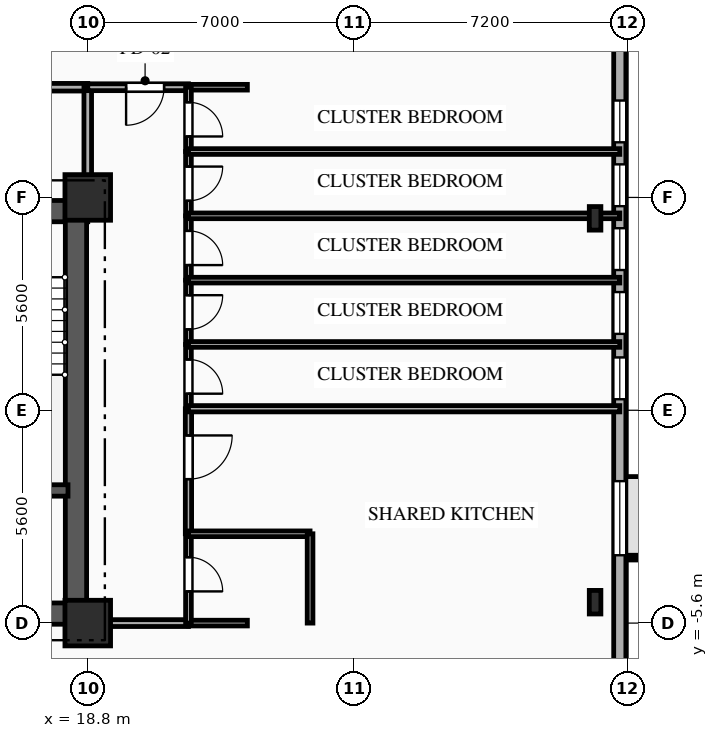
"""IFC4 building model, lengths in metres.
Left out: names, types, materials, properties, quantities, classifications, styles, units other than length and angle.
Written with IfcOpenShell. Run it as: python <this file> out.ifc"""

import sys

from ifc_helpers import new_model, si_unit, direction, frame, frame_2d, origin, origin_2d, place, context, subcontext, project, spatial, rectangle, i_section, extrude, element, fill, save


model = new_model("IFC4")
c1 = context("Model", 3, precision=1e-05, world=origin(), true_north=direction((0.0, 1.0)))
c2 = subcontext(c1, "Body", "Model", "MODEL_VIEW")
j1 = project(units=[si_unit("LENGTHUNIT", "METRE"), si_unit("PLANEANGLEUNIT", "RADIAN")], contexts=[c1])
p1 = place(None, origin())
s1 = spatial("IfcSite", under=j1, at=p1, CompositionType="ELEMENT")
p2 = place(p1, origin())
s2 = spatial("IfcBuilding", under=s1, at=p2, CompositionType="ELEMENT")
p3 = place(p2, frame((0.0, 0.0, 43.75)))
s3 = spatial("IfcBuildingStorey", under=s2, at=p3, CompositionType="ELEMENT", Elevation=43.75)
for number, where, z_axis, x_axis in (
    (1, (18.8, -5.6, 0.0), (0.0, 0.0, 1.0), (1.0, 0.0, 0.0)),
    (2, (18.8, 5.6, 0.0), (0.0, 0.0, 1.0), (1.0, 0.0, 0.0)),
):
    element("IfcColumn", number, at=place(p3, frame(where, z_axis=z_axis, x_axis=x_axis)), inside=s3, PredefinedType="COLUMN", context=c2, shape_type="SweptSolid", body=[
        extrude(rectangle(XDim=1.2, YDim=1.2, at=origin_2d()), origin(), (0.0, 0.0, 1.0), 3.35),
    ])
for number, where, z_axis, x_axis in (
    (3, (32.15, -5.05, 0.0), (0.0, 0.0, 1.0), (1.0, 0.0, 0.0)),
    (4, (32.15, 5.05, 0.0), (0.0, 0.0, 1.0), (1.0, 0.0, 0.0)),
):
    element("IfcColumn", number, at=place(p3, frame(where, z_axis=z_axis, x_axis=x_axis)), inside=s3, PredefinedType="COLUMN", context=c2, shape_type="SweptSolid", body=[
        extrude(i_section(OverallWidth=0.305, OverallDepth=0.62, WebThickness=0.021, FlangeThickness=0.04, FilletRadius=0.027, at=origin_2d()), origin(), (0.0, 0.0, 1.0), 3.35),
    ])
p4 = place(p3, frame((32.8, 15.8, 0.0), z_axis=(0.0, 0.0, 1.0), x_axis=(0.0, -1.0, 0.0)))
e5 = element("IfcWall", 5, at=p4, inside=s3, PredefinedType="SOLIDWALL", context=c2, shape_type="SweptSolid", body=[
    extrude(rectangle(XDim=31.6, YDim=0.32, at=frame_2d((15.8, 0.0))), origin(), (0.0, 0.0, 1.0), 3.035),
])
p5 = place(p4, frame((7.65, 0.0, 0.85)))
e6 = element("IfcOpeningElement", 6, at=p5, cuts=e5, PredefinedType="OPENING", context=c2, shape_type="SweptSolid", body=[
    extrude(rectangle(XDim=1.1, YDim=1.85, at=frame_2d((0.55, 0.925))), frame((0.0, 0.17, 0.0), z_axis=(0.0, -1.0, 0.0), x_axis=(1.0, 0.0, 0.0)), (0.0, 0.0, 1.0), 0.34),
])
p6 = place(p4, frame((9.33, 0.0, 0.85)))
e7 = element("IfcOpeningElement", 7, at=p6, cuts=e5, PredefinedType="OPENING", context=c2, shape_type="SweptSolid", body=[
    extrude(rectangle(XDim=1.1, YDim=1.85, at=frame_2d((0.55, 0.925))), frame((0.0, 0.17, 0.0), z_axis=(0.0, -1.0, 0.0), x_axis=(1.0, 0.0, 0.0)), (0.0, 0.0, 1.0), 0.34),
])
p7 = place(p4, frame((11.01, 0.0, 0.85)))
e8 = element("IfcOpeningElement", 8, at=p7, cuts=e5, PredefinedType="OPENING", context=c2, shape_type="SweptSolid", body=[
    extrude(rectangle(XDim=1.1, YDim=1.85, at=frame_2d((0.55, 0.925))), frame((0.0, 0.17, 0.0), z_axis=(0.0, -1.0, 0.0), x_axis=(1.0, 0.0, 0.0)), (0.0, 0.0, 1.0), 0.34),
])
p8 = place(p4, frame((12.69, 0.0, 0.85)))
e9 = element("IfcOpeningElement", 9, at=p8, cuts=e5, PredefinedType="OPENING", context=c2, shape_type="SweptSolid", body=[
    extrude(rectangle(XDim=1.1, YDim=1.85, at=frame_2d((0.55, 0.925))), frame((0.0, 0.17, 0.0), z_axis=(0.0, -1.0, 0.0), x_axis=(1.0, 0.0, 0.0)), (0.0, 0.0, 1.0), 0.34),
])
p9 = place(p4, frame((14.41, 0.0, 0.85)))
e10 = element("IfcOpeningElement", 10, at=p9, cuts=e5, PredefinedType="OPENING", context=c2, shape_type="SweptSolid", body=[
    extrude(rectangle(XDim=1.1, YDim=1.85, at=frame_2d((0.55, 0.925))), frame((0.0, 0.17, 0.0), z_axis=(0.0, -1.0, 0.0), x_axis=(1.0, 0.0, 0.0)), (0.0, 0.0, 1.0), 0.34),
])
p10 = place(p4, frame((17.665, 0.0, 0.85)))
e11 = element("IfcOpeningElement", 11, at=p10, cuts=e5, PredefinedType="OPENING", context=c2, shape_type="SweptSolid", body=[
    extrude(rectangle(XDim=1.95, YDim=1.85, at=frame_2d((0.975, 0.925))), frame((0.0, 0.17, 0.0), z_axis=(0.0, -1.0, 0.0), x_axis=(1.0, 0.0, 0.0)), (0.0, 0.0, 1.0), 0.34),
])
p11 = place(p3, frame((9.2, 5.24, 0.0), z_axis=(0.0, 0.0, 1.0), x_axis=(1.0, 0.0, 0.0)))
e12 = element("IfcWall", 12, at=p11, inside=s3, PredefinedType="SHEAR", context=c2, shape_type="SweptSolid", body=[
    extrude(rectangle(XDim=9.6, YDim=0.56, at=frame_2d((4.8, 0.0))), origin(), (0.0, 0.0, 1.0), 3.035),
])
p12 = place(p11, frame((6.95, 0.0, 0.0)))
e13 = element("IfcOpeningElement", 13, at=p12, cuts=e12, PredefinedType="OPENING", context=c2, shape_type="SweptSolid", body=[
    extrude(rectangle(XDim=1.1, YDim=2.15, at=frame_2d((0.55, 1.075))), frame((0.0, 0.29, 0.0), z_axis=(0.0, -1.0, 0.0), x_axis=(1.0, 0.0, 0.0)), (0.0, 0.0, 1.0), 0.58),
])
p13 = place(p11, frame((3.775, 0.0, 0.0)))
e14 = element("IfcOpeningElement", 14, at=p13, cuts=e12, PredefinedType="OPENING", context=c2, shape_type="SweptSolid", body=[
    extrude(rectangle(XDim=1.05, YDim=2.1, at=frame_2d((0.525, 1.05))), frame((0.0, 0.29, 0.0), z_axis=(0.0, -1.0, 0.0), x_axis=(1.0, 0.0, 0.0)), (0.0, 0.0, 1.0), 0.58),
])
p14 = place(p3, frame((9.2, -5.35, 0.0), z_axis=(0.0, 0.0, 1.0), x_axis=(1.0, 0.0, 0.0)))
e15 = element("IfcWall", 15, at=p14, inside=s3, PredefinedType="SHEAR", context=c2, shape_type="SweptSolid", body=[
    extrude(rectangle(XDim=9.6, YDim=0.56, at=frame_2d((4.8, 0.0))), origin(), (0.0, 0.0, 1.0), 3.035),
])
p15 = place(p14, frame((7.65, 0.0, 0.0)))
e16 = element("IfcOpeningElement", 16, at=p15, cuts=e15, PredefinedType="OPENING", context=c2, shape_type="SweptSolid", body=[
    extrude(rectangle(XDim=0.9, YDim=2.1, at=frame_2d((0.45, 1.05))), frame((0.0, 0.29, 0.0), z_axis=(0.0, -1.0, 0.0), x_axis=(1.0, 0.0, 0.0)), (0.0, 0.0, 1.0), 0.58),
])
p16 = place(p3, frame((18.49, -5.05, 0.0), z_axis=(0.0, 0.0, 1.0), x_axis=(0.0, 1.0, 0.0)))
e17 = element("IfcWall", 17, at=p16, inside=s3, PredefinedType="SHEAR", context=c2, shape_type="SweptSolid", body=[
    extrude(rectangle(XDim=10.1, YDim=0.56, at=frame_2d((5.05, 0.0))), origin(), (0.0, 0.0, 1.0), 3.035),
])
p17 = place(p3, frame((15.1, -2.11, 0.0), z_axis=(0.0, 0.0, 1.0), x_axis=(1.0, 0.0, 0.0)))
e18 = element("IfcWall", 18, at=p17, inside=s3, PredefinedType="SHEAR", context=c2, shape_type="SweptSolid", body=[
    extrude(rectangle(XDim=3.18, YDim=0.3, at=frame_2d((1.59, 0.0))), origin(), (0.0, 0.0, 1.0), 3.035),
])
p18 = place(p3, frame((18.8, 8.5, 0.0), z_axis=(0.0, 0.0, 1.0), x_axis=(-1.0, 0.0, 0.0)))
e19 = element("IfcWall", 19, at=p18, inside=s3, PredefinedType="PARTITIONING", context=c2, shape_type="SweptSolid", body=[
    extrude(rectangle(XDim=6.8, YDim=0.2, at=frame_2d((3.4, 0.0))), origin(), (0.0, 0.0, 1.0), 3.035),
])
p19 = place(p18, frame((3.985, 0.0, 0.0)))
e20 = element("IfcOpeningElement", 20, at=p19, cuts=e19, PredefinedType="OPENING", context=c2, shape_type="SweptSolid", body=[
    extrude(rectangle(XDim=1.1, YDim=2.15, at=frame_2d((0.55, 1.075))), frame((0.0, 0.11, 0.0), z_axis=(0.0, -1.0, 0.0), x_axis=(1.0, 0.0, 0.0)), (0.0, 0.0, 1.0), 0.22),
])
p20 = place(p3, frame((18.8, 5.6, 0.0), z_axis=(0.0, 0.0, 1.0), x_axis=(0.0, 1.0, 0.0)))
e21 = element("IfcWall", 21, at=p20, inside=s3, PredefinedType="PARTITIONING", context=c2, shape_type="SweptSolid", body=[
    extrude(rectangle(XDim=2.9, YDim=0.2, at=frame_2d((1.45, 0.0))), origin(), (0.0, 0.0, 1.0), 2.52),
])
p21 = place(p3, frame((21.45, 8.5, 0.0), z_axis=(0.0, 0.0, 1.0), x_axis=(-1.0, 0.0, 0.0)))
e22 = element("IfcWall", 22, at=p21, inside=s3, PredefinedType="PARTITIONING", context=c2, shape_type="SweptSolid", body=[
    extrude(rectangle(XDim=2.65, YDim=0.18, at=frame_2d((1.325, 0.0))), origin(), (0.0, 0.0, 1.0), 3.035),
])
p22 = place(p21, frame((0.641, 0.0, 0.0)))
e23 = element("IfcOpeningElement", 23, at=p22, cuts=e22, PredefinedType="OPENING", context=c2, shape_type="SweptSolid", body=[
    extrude(rectangle(XDim=1.0, YDim=2.15, at=frame_2d((0.5, 1.075))), frame((0.0, 0.1, 0.0), z_axis=(0.0, -1.0, 0.0), x_axis=(1.0, 0.0, 0.0)), (0.0, 0.0, 1.0), 0.2),
])
p23 = place(p3, frame((23.0, 8.5, 0.0), z_axis=(0.0, 0.0, 1.0), x_axis=(-1.0, 0.0, 0.0)))
e24 = element("IfcWall", 24, at=p23, inside=s3, PredefinedType="PARTITIONING", context=c2, shape_type="SweptSolid", body=[
    extrude(rectangle(XDim=1.55, YDim=0.15, at=frame_2d((0.775, 0.0))), origin(), (0.0, 0.0, 1.0), 3.035),
])
p24 = place(p3, frame((18.8, -5.6, 0.0), z_axis=(0.0, 0.0, 1.0), x_axis=(1.0, 0.0, 0.0)))
e25 = element("IfcWall", 25, at=p24, inside=s3, PredefinedType="PARTITIONING", context=c2, shape_type="SweptSolid", body=[
    extrude(rectangle(XDim=2.65, YDim=0.18, at=frame_2d((1.325, 0.0))), origin(), (0.0, 0.0, 1.0), 3.035),
])
p25 = place(p3, frame((21.45, -5.6, 0.0), z_axis=(0.0, 0.0, 1.0), x_axis=(1.0, 0.0, 0.0)))
e26 = element("IfcWall", 26, at=p25, inside=s3, PredefinedType="PLUMBINGWALL", context=c2, shape_type="SweptSolid", body=[
    extrude(rectangle(XDim=1.55, YDim=0.15, at=frame_2d((0.775, 0.0))), origin(), (0.0, 0.0, 1.0), 3.035),
])
p26 = place(p3, frame((21.45, -3.25, 0.0), z_axis=(0.0, 0.0, 1.0), x_axis=(0.0, -1.0, 0.0)))
e27 = element("IfcWall", 27, at=p26, inside=s3, PredefinedType="PLUMBINGWALL", context=c2, shape_type="SweptSolid", body=[
    extrude(rectangle(XDim=2.35, YDim=0.15, at=frame_2d((1.175, 0.0))), origin(), (0.0, 0.0, 1.0), 3.035),
])
p27 = place(p26, frame((0.616, 0.0, 0.0)))
e28 = element("IfcOpeningElement", 28, at=p27, cuts=e27, PredefinedType="OPENING", context=c2, shape_type="SweptSolid", body=[
    extrude(rectangle(XDim=0.9, YDim=2.1, at=frame_2d((0.45, 1.05))), frame((0.0, 0.085, 0.0), z_axis=(0.0, -1.0, 0.0), x_axis=(1.0, 0.0, 0.0)), (0.0, 0.0, 1.0), 0.17),
])
p28 = place(p3, frame((21.45, 0.04, 0.0), z_axis=(0.0, 0.0, 1.0), x_axis=(0.0, -1.0, 0.0)))
e29 = element("IfcWall", 29, at=p28, inside=s3, PredefinedType="PARTITIONING", context=c2, shape_type="SweptSolid", body=[
    extrude(rectangle(XDim=3.29, YDim=0.165, at=frame_2d((1.645, 0.0))), origin(), (0.0, 0.0, 1.0), 3.035),
])
p29 = place(p28, frame((0.702, 0.0, 0.0)))
e30 = element("IfcOpeningElement", 30, at=p29, cuts=e29, PredefinedType="OPENING", context=c2, shape_type="SweptSolid", body=[
    extrude(rectangle(XDim=1.15, YDim=2.15, at=frame_2d((0.575, 1.075))), frame((0.0, 0.093, 0.0), z_axis=(0.0, -1.0, 0.0), x_axis=(1.0, 0.0, 0.0)), (0.0, 0.0, 1.0), 0.185),
])
p30 = place(p3, frame((21.45, 1.732, 0.0), z_axis=(0.0, 0.0, 1.0), x_axis=(0.0, -1.0, 0.0)))
e31 = element("IfcWall", 31, at=p30, inside=s3, PredefinedType="PARTITIONING", context=c2, shape_type="SweptSolid", body=[
    extrude(rectangle(XDim=1.692, YDim=0.15, at=frame_2d((0.846, 0.0))), origin(), (0.0, 0.0, 1.0), 3.035),
])
p31 = place(p30, frame((0.396, 0.0, 0.0)))
e32 = element("IfcOpeningElement", 32, at=p31, cuts=e31, PredefinedType="OPENING", context=c2, shape_type="SweptSolid", body=[
    extrude(rectangle(XDim=0.9, YDim=2.1, at=frame_2d((0.45, 1.05))), frame((0.0, 0.085, 0.0), z_axis=(0.0, -1.0, 0.0), x_axis=(1.0, 0.0, 0.0)), (0.0, 0.0, 1.0), 0.17),
])
p32 = place(p3, frame((21.45, 3.424, 0.0), z_axis=(0.0, 0.0, 1.0), x_axis=(0.0, -1.0, 0.0)))
e33 = element("IfcWall", 33, at=p32, inside=s3, PredefinedType="PARTITIONING", context=c2, shape_type="SweptSolid", body=[
    extrude(rectangle(XDim=1.692, YDim=0.15, at=frame_2d((0.846, 0.0))), origin(), (0.0, 0.0, 1.0), 3.035),
])
p33 = place(p32, frame((0.396, 0.0, 0.0)))
e34 = element("IfcOpeningElement", 34, at=p33, cuts=e33, PredefinedType="OPENING", context=c2, shape_type="SweptSolid", body=[
    extrude(rectangle(XDim=0.9, YDim=2.1, at=frame_2d((0.45, 1.05))), frame((0.0, 0.085, 0.0), z_axis=(0.0, -1.0, 0.0), x_axis=(1.0, 0.0, 0.0)), (0.0, 0.0, 1.0), 0.17),
])
p34 = place(p3, frame((21.45, 5.116, 0.0), z_axis=(0.0, 0.0, 1.0), x_axis=(0.0, -1.0, 0.0)))
e35 = element("IfcWall", 35, at=p34, inside=s3, PredefinedType="PARTITIONING", context=c2, shape_type="SweptSolid", body=[
    extrude(rectangle(XDim=1.692, YDim=0.15, at=frame_2d((0.846, 0.0))), origin(), (0.0, 0.0, 1.0), 3.035),
])
p35 = place(p34, frame((0.396, 0.0, 0.0)))
e36 = element("IfcOpeningElement", 36, at=p35, cuts=e35, PredefinedType="OPENING", context=c2, shape_type="SweptSolid", body=[
    extrude(rectangle(XDim=0.9, YDim=2.1, at=frame_2d((0.45, 1.05))), frame((0.0, 0.085, 0.0), z_axis=(0.0, -1.0, 0.0), x_axis=(1.0, 0.0, 0.0)), (0.0, 0.0, 1.0), 0.17),
])
p36 = place(p3, frame((21.45, 6.808, 0.0), z_axis=(0.0, 0.0, 1.0), x_axis=(0.0, -1.0, 0.0)))
e37 = element("IfcWall", 37, at=p36, inside=s3, PredefinedType="PARTITIONING", context=c2, shape_type="SweptSolid", body=[
    extrude(rectangle(XDim=1.692, YDim=0.15, at=frame_2d((0.846, 0.0))), origin(), (0.0, 0.0, 1.0), 3.035),
])
p37 = place(p36, frame((0.396, 0.0, 0.0)))
e38 = element("IfcOpeningElement", 38, at=p37, cuts=e37, PredefinedType="OPENING", context=c2, shape_type="SweptSolid", body=[
    extrude(rectangle(XDim=0.9, YDim=2.1, at=frame_2d((0.45, 1.05))), frame((0.0, 0.085, 0.0), z_axis=(0.0, -1.0, 0.0), x_axis=(1.0, 0.0, 0.0)), (0.0, 0.0, 1.0), 0.17),
])
p38 = place(p3, frame((21.45, 8.5, 0.0), z_axis=(0.0, 0.0, 1.0), x_axis=(0.0, -1.0, 0.0)))
e39 = element("IfcWall", 39, at=p38, inside=s3, PredefinedType="PARTITIONING", context=c2, shape_type="SweptSolid", body=[
    extrude(rectangle(XDim=1.692, YDim=0.15, at=frame_2d((0.846, 0.0))), origin(), (0.0, 0.0, 1.0), 3.035),
])
p39 = place(p38, frame((0.396, 0.0, 0.0)))
e40 = element("IfcOpeningElement", 40, at=p39, cuts=e39, PredefinedType="OPENING", context=c2, shape_type="SweptSolid", body=[
    extrude(rectangle(XDim=0.9, YDim=2.1, at=frame_2d((0.45, 1.05))), frame((0.0, 0.085, 0.0), z_axis=(0.0, -1.0, 0.0), x_axis=(1.0, 0.0, 0.0)), (0.0, 0.0, 1.0), 0.17),
])
p40 = place(p3, frame((21.45, -3.25, 0.0), z_axis=(0.0, 0.0, 1.0), x_axis=(1.0, 0.0, 0.0)))
e41 = element("IfcWall", 41, at=p40, inside=s3, PredefinedType="PLUMBINGWALL", context=c2, shape_type="SweptSolid", body=[
    extrude(rectangle(XDim=3.2, YDim=0.15, at=frame_2d((1.6, 0.0))), origin(), (0.0, 0.0, 1.0), 2.52),
])
p41 = place(p3, frame((24.65, -3.25, 0.0), z_axis=(0.0, 0.0, 1.0), x_axis=(0.0, -1.0, 0.0)))
e42 = element("IfcWall", 42, at=p41, inside=s3, PredefinedType="PLUMBINGWALL", context=c2, shape_type="SweptSolid", body=[
    extrude(rectangle(XDim=2.35, YDim=0.15, at=frame_2d((1.175, 0.0))), origin(), (0.0, 0.0, 1.0), 3.035),
])
p42 = place(p3, frame((21.45, 0.04, 0.0), z_axis=(0.0, 0.0, 1.0), x_axis=(1.0, 0.0, 0.0)))
e43 = element("IfcWall", 43, at=p42, inside=s3, PredefinedType="PARTITIONING", context=c2, shape_type="SweptSolid", body=[
    extrude(rectangle(XDim=11.35, YDim=0.165, at=frame_2d((5.675, 0.0))), origin(), (0.0, 0.0, 1.0), 3.035),
])
p43 = place(p3, frame((21.45, 1.732, 0.0), z_axis=(0.0, 0.0, 1.0), x_axis=(1.0, 0.0, 0.0)))
e44 = element("IfcWall", 44, at=p43, inside=s3, PredefinedType="PARTITIONING", context=c2, shape_type="SweptSolid", body=[
    extrude(rectangle(XDim=11.35, YDim=0.15, at=frame_2d((5.675, 0.0))), origin(), (0.0, 0.0, 1.0), 3.035),
])
for number, where, z_axis, x_axis in (
    (45, (21.45, 3.424, 0.0), (0.0, 0.0, 1.0), (1.0, 0.0, 0.0)),
    (46, (21.45, 5.116, 0.0), (0.0, 0.0, 1.0), (1.0, 0.0, 0.0)),
):
    element("IfcWall", number, at=place(p3, frame(where, z_axis=z_axis, x_axis=x_axis)), inside=s3, PredefinedType="PARTITIONING", context=c2, shape_type="SweptSolid", body=[
        extrude(rectangle(XDim=11.35, YDim=0.15, at=frame_2d((5.675, 0.0))), origin(), (0.0, 0.0, 1.0), 2.52),
    ])
p44 = place(p3, frame((21.45, 6.808, 0.0), z_axis=(0.0, 0.0, 1.0), x_axis=(1.0, 0.0, 0.0)))
e47 = element("IfcWall", 47, at=p44, inside=s3, PredefinedType="PARTITIONING", context=c2, shape_type="SweptSolid", body=[
    extrude(rectangle(XDim=11.35, YDim=0.15, at=frame_2d((5.675, 0.0))), origin(), (0.0, 0.0, 1.0), 3.035),
])
p45 = place(p5, origin())
e48 = element("IfcWindow", 48, at=p45, inside=s3, PartitioningType="SINGLE_PANEL", PredefinedType="WINDOW", context=c2, shape_type="SweptSolid", body=[
    extrude(rectangle(XDim=1.1, YDim=1.85, at=frame_2d((0.55, 0.925))), frame((0.0, 0.03, 0.0), z_axis=(0.0, -1.0, 0.0), x_axis=(1.0, 0.0, 0.0)), (0.0, 0.0, 1.0), 0.06),
])
fill(e6, e48)
p46 = place(p6, origin())
e49 = element("IfcWindow", 49, at=p46, inside=s3, PartitioningType="SINGLE_PANEL", PredefinedType="WINDOW", context=c2, shape_type="SweptSolid", body=[
    extrude(rectangle(XDim=1.1, YDim=1.85, at=frame_2d((0.55, 0.925))), frame((0.0, 0.03, 0.0), z_axis=(0.0, -1.0, 0.0), x_axis=(1.0, 0.0, 0.0)), (0.0, 0.0, 1.0), 0.06),
])
fill(e7, e49)
p47 = place(p7, origin())
e50 = element("IfcWindow", 50, at=p47, inside=s3, PartitioningType="SINGLE_PANEL", PredefinedType="WINDOW", context=c2, shape_type="SweptSolid", body=[
    extrude(rectangle(XDim=1.1, YDim=1.85, at=frame_2d((0.55, 0.925))), frame((0.0, 0.03, 0.0), z_axis=(0.0, -1.0, 0.0), x_axis=(1.0, 0.0, 0.0)), (0.0, 0.0, 1.0), 0.06),
])
fill(e8, e50)
p48 = place(p8, origin())
e51 = element("IfcWindow", 51, at=p48, inside=s3, PartitioningType="SINGLE_PANEL", PredefinedType="WINDOW", context=c2, shape_type="SweptSolid", body=[
    extrude(rectangle(XDim=1.1, YDim=1.85, at=frame_2d((0.55, 0.925))), frame((0.0, 0.03, 0.0), z_axis=(0.0, -1.0, 0.0), x_axis=(1.0, 0.0, 0.0)), (0.0, 0.0, 1.0), 0.06),
])
fill(e9, e51)
p49 = place(p9, origin())
e52 = element("IfcWindow", 52, at=p49, inside=s3, PartitioningType="SINGLE_PANEL", PredefinedType="WINDOW", context=c2, shape_type="SweptSolid", body=[
    extrude(rectangle(XDim=1.1, YDim=1.85, at=frame_2d((0.55, 0.925))), frame((0.0, 0.03, 0.0), z_axis=(0.0, -1.0, 0.0), x_axis=(1.0, 0.0, 0.0)), (0.0, 0.0, 1.0), 0.06),
])
fill(e10, e52)
p50 = place(p10, origin())
e53 = element("IfcWindow", 53, at=p50, inside=s3, PartitioningType="SINGLE_PANEL", PredefinedType="WINDOW", context=c2, shape_type="SweptSolid", body=[
    extrude(rectangle(XDim=1.95, YDim=1.85, at=frame_2d((0.975, 0.925))), frame((0.0, 0.03, 0.0), z_axis=(0.0, -1.0, 0.0), x_axis=(1.0, 0.0, 0.0)), (0.0, 0.0, 1.0), 0.06),
])
fill(e11, e53)
p51 = place(p22, origin())
e54 = element("IfcDoor", 54, at=p51, inside=s3, OperationType="SINGLE_SWING_RIGHT", PredefinedType="DOOR", context=c2, shape_type="SweptSolid", body=[
    extrude(rectangle(XDim=1.0, YDim=2.15, at=frame_2d((0.5, 1.075))), frame((0.0, 0.025, 0.0), z_axis=(0.0, -1.0, 0.0), x_axis=(1.0, 0.0, 0.0)), (0.0, 0.0, 1.0), 0.05),
])
fill(e23, e54)
p52 = place(p27, origin())
e55 = element("IfcDoor", 55, at=p52, inside=s3, OperationType="SINGLE_SWING_RIGHT", PredefinedType="DOOR", context=c2, shape_type="SweptSolid", body=[
    extrude(rectangle(XDim=0.9, YDim=2.1, at=frame_2d((0.45, 1.05))), frame((0.0, 0.025, 0.0), z_axis=(0.0, -1.0, 0.0), x_axis=(1.0, 0.0, 0.0)), (0.0, 0.0, 1.0), 0.05),
])
fill(e28, e55)
p53 = place(p29, origin())
e56 = element("IfcDoor", 56, at=p53, inside=s3, OperationType="SINGLE_SWING_LEFT", PredefinedType="DOOR", context=c2, shape_type="SweptSolid", body=[
    extrude(rectangle(XDim=1.15, YDim=2.15, at=frame_2d((0.575, 1.075))), frame((0.0, 0.025, 0.0), z_axis=(0.0, -1.0, 0.0), x_axis=(1.0, 0.0, 0.0)), (0.0, 0.0, 1.0), 0.05),
])
fill(e30, e56)
p54 = place(p31, origin())
e57 = element("IfcDoor", 57, at=p54, inside=s3, OperationType="SINGLE_SWING_RIGHT", PredefinedType="DOOR", context=c2, shape_type="SweptSolid", body=[
    extrude(rectangle(XDim=0.9, YDim=2.1, at=frame_2d((0.45, 1.05))), frame((0.0, 0.025, 0.0), z_axis=(0.0, -1.0, 0.0), x_axis=(1.0, 0.0, 0.0)), (0.0, 0.0, 1.0), 0.05),
])
fill(e32, e57)
p55 = place(p33, origin())
e58 = element("IfcDoor", 58, at=p55, inside=s3, OperationType="SINGLE_SWING_LEFT", PredefinedType="DOOR", context=c2, shape_type="SweptSolid", body=[
    extrude(rectangle(XDim=0.9, YDim=2.1, at=frame_2d((0.45, 1.05))), frame((0.0, 0.025, 0.0), z_axis=(0.0, -1.0, 0.0), x_axis=(1.0, 0.0, 0.0)), (0.0, 0.0, 1.0), 0.05),
])
fill(e34, e58)
p56 = place(p35, origin())
e59 = element("IfcDoor", 59, at=p56, inside=s3, OperationType="SINGLE_SWING_RIGHT", PredefinedType="DOOR", context=c2, shape_type="SweptSolid", body=[
    extrude(rectangle(XDim=0.9, YDim=2.1, at=frame_2d((0.45, 1.05))), frame((0.0, 0.025, 0.0), z_axis=(0.0, -1.0, 0.0), x_axis=(1.0, 0.0, 0.0)), (0.0, 0.0, 1.0), 0.05),
])
fill(e36, e59)
p57 = place(p37, origin())
e60 = element("IfcDoor", 60, at=p57, inside=s3, OperationType="SINGLE_SWING_LEFT", PredefinedType="DOOR", context=c2, shape_type="SweptSolid", body=[
    extrude(rectangle(XDim=0.9, YDim=2.1, at=frame_2d((0.45, 1.05))), frame((0.0, 0.025, 0.0), z_axis=(0.0, -1.0, 0.0), x_axis=(1.0, 0.0, 0.0)), (0.0, 0.0, 1.0), 0.05),
])
fill(e38, e60)
p58 = place(p39, origin())
e61 = element("IfcDoor", 61, at=p58, inside=s3, OperationType="SINGLE_SWING_RIGHT", PredefinedType="DOOR", context=c2, shape_type="SweptSolid", body=[
    extrude(rectangle(XDim=0.9, YDim=2.1, at=frame_2d((0.45, 1.05))), frame((0.0, 0.025, 0.0), z_axis=(0.0, -1.0, 0.0), x_axis=(1.0, 0.0, 0.0)), (0.0, 0.0, 1.0), 0.05),
])
fill(e40, e61)
save(model, sys.argv[1])
